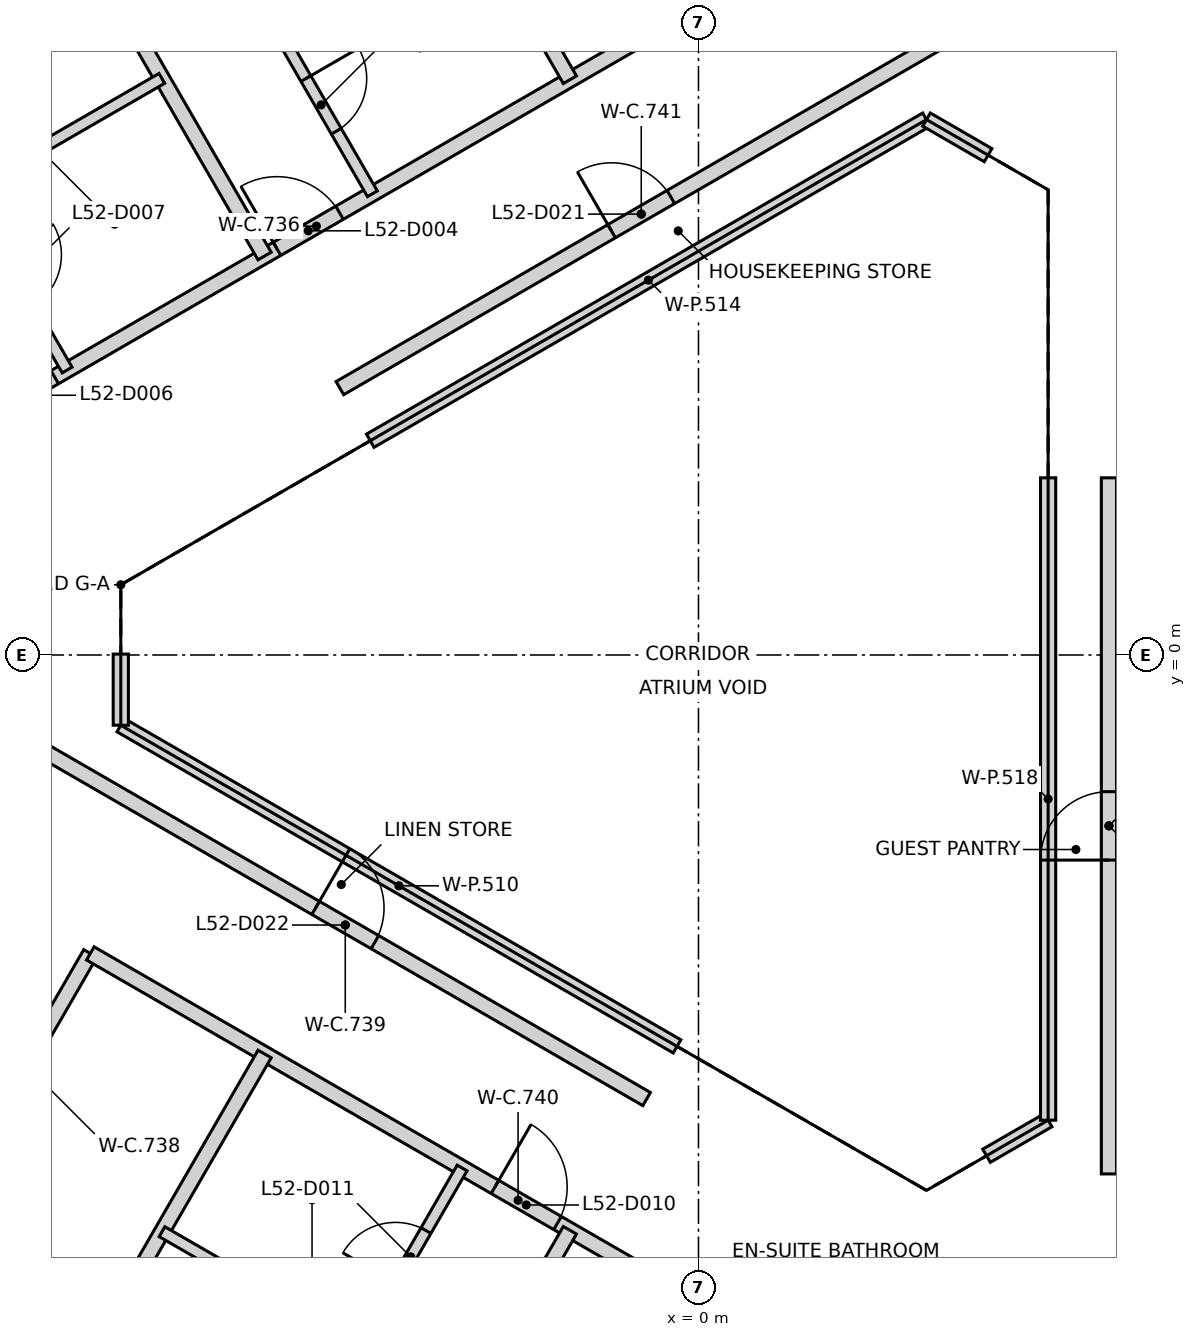
"""IFC4 building model, lengths in metres.
Left out: names, types, materials, properties, quantities, classifications, styles, units other than length and angle.
Written with IfcOpenShell. Run it as: python <this file> out.ifc"""

import sys

from ifc_helpers import new_model, si_unit, direction, frame, frame_2d, origin, place, context, subcontext, project, spatial, rectangle, extrude, element, fill, save


model = new_model("IFC4")
c1 = context("Model", 3, precision=1e-05, world=origin(), true_north=direction((0.0, 1.0)))
c2 = subcontext(c1, "Body", "Model", "MODEL_VIEW")
j1 = project(units=[si_unit("LENGTHUNIT", "METRE"), si_unit("PLANEANGLEUNIT", "RADIAN")], contexts=[c1])
p1 = place(None, origin())
s1 = spatial("IfcSite", under=j1, at=p1, CompositionType="ELEMENT")
p2 = place(p1, origin())
s2 = spatial("IfcBuilding", under=s1, at=p2, CompositionType="ELEMENT")
p3 = place(p2, frame((0.0, 0.0, 208.0)))
s3 = spatial("IfcBuildingStorey", under=s2, at=p3, CompositionType="ELEMENT", Elevation=208.0)
p4 = place(p3, frame((10.42, 6.498, 0.0), z_axis=(0.0, 0.0, 1.0), x_axis=(-0.866021906294, 0.500006057782, 0.0)))
e1 = element("IfcWall", 1, at=p4, inside=s3, PredefinedType="SHEAR", context=c2, shape_type="SweptSolid", body=[
    extrude(rectangle(XDim=11.55, YDim=0.25, at=frame_2d((5.775, 0.0))), origin(), (0.0, 0.0, 1.0), 3.2),
])
p5 = place(p4, frame((10.025, 0.0, 0.0)))
e2 = element("IfcOpeningElement", 2, at=p5, cuts=e1, PredefinedType="OPENING", context=c2, shape_type="SweptSolid", body=[
    extrude(rectangle(XDim=1.2, YDim=2.1, at=frame_2d((0.6, 1.05))), frame((0.0, 0.135, 0.0), z_axis=(0.0, -1.0, 0.0), x_axis=(1.0, 0.0, 0.0)), (0.0, 0.0, 1.0), 0.27),
])
p6 = place(p4, frame((8.725, 0.0, 0.0)))
e3 = element("IfcOpeningElement", 3, at=p6, cuts=e1, PredefinedType="OPENING", context=c2, shape_type="SweptSolid", body=[
    extrude(rectangle(XDim=1.2, YDim=2.1, at=frame_2d((0.6, 1.05))), frame((0.0, 0.135, 0.0), z_axis=(0.0, -1.0, 0.0), x_axis=(1.0, 0.0, 0.0)), (0.0, 0.0, 1.0), 0.27),
])
p7 = place(p3, frame((0.417, -12.273, 0.0), z_axis=(0.0, 0.0, 1.0), x_axis=(0.866021906294, 0.500006057782, 0.0)))
e4 = element("IfcWall", 4, at=p7, inside=s3, PredefinedType="SHEAR", context=c2, shape_type="SweptSolid", body=[
    extrude(rectangle(XDim=11.55, YDim=0.25, at=frame_2d((5.775, 0.0))), origin(), (0.0, 0.0, 1.0), 3.2),
])
p8 = place(p7, frame((10.025, 0.0, 0.0)))
e5 = element("IfcOpeningElement", 5, at=p8, cuts=e4, PredefinedType="OPENING", context=c2, shape_type="SweptSolid", body=[
    extrude(rectangle(XDim=1.2, YDim=2.1, at=frame_2d((0.6, 1.05))), frame((0.0, 0.135, 0.0), z_axis=(0.0, -1.0, 0.0), x_axis=(1.0, 0.0, 0.0)), (0.0, 0.0, 1.0), 0.27),
])
p9 = place(p7, frame((8.725, 0.0, 0.0)))
e6 = element("IfcOpeningElement", 6, at=p9, cuts=e4, PredefinedType="OPENING", context=c2, shape_type="SweptSolid", body=[
    extrude(rectangle(XDim=1.2, YDim=2.1, at=frame_2d((0.6, 1.05))), frame((0.0, 0.135, 0.0), z_axis=(0.0, -1.0, 0.0), x_axis=(1.0, 0.0, 0.0)), (0.0, 0.0, 1.0), 0.27),
])
p10 = place(p3, frame((-10.652, 2.394, 0.0), z_axis=(0.0, 0.0, 1.0), x_axis=(0.866016271077, 0.500015817979, 0.0)))
e7 = element("IfcWall", 7, at=p10, inside=s3, PredefinedType="PARTITIONING", context=c2, shape_type="SweptSolid", body=[
    extrude(rectangle(XDim=12.991, YDim=0.2, at=frame_2d((6.495, 0.0))), origin(), (0.0, 0.0, 1.0), 3.2),
])
p11 = place(p10, frame((5.898, 0.0, 0.0)))
e8 = element("IfcOpeningElement", 8, at=p11, cuts=e7, PredefinedType="OPENING", context=c2, shape_type="SweptSolid", body=[
    extrude(rectangle(XDim=0.95, YDim=2.1, at=frame_2d((0.475, 1.05))), frame((0.0, 0.11, 0.0), z_axis=(0.0, -1.0, 0.0), x_axis=(1.0, 0.0, 0.0)), (0.0, 0.0, 1.0), 0.22),
])
p12 = place(p10, frame((1.571, 0.0, 0.0)))
e9 = element("IfcOpeningElement", 9, at=p12, cuts=e7, PredefinedType="OPENING", context=c2, shape_type="SweptSolid", body=[
    extrude(rectangle(XDim=0.95, YDim=2.1, at=frame_2d((0.475, 1.05))), frame((0.0, 0.11, 0.0), z_axis=(0.0, -1.0, 0.0), x_axis=(1.0, 0.0, 0.0)), (0.0, 0.0, 1.0), 0.22),
])
p13 = place(p3, frame((-9.697, -6.864, 0.0), z_axis=(0.0, 0.0, 1.0), x_axis=(0.499955030392, 0.866051365443, 0.0)))
e10 = element("IfcWall", 10, at=p13, inside=s3, PredefinedType="PARTITIONING", context=c2, shape_type="SweptSolid", body=[
    extrude(rectangle(XDim=3.392, YDim=0.2, at=frame_2d((1.696, 0.0))), origin(), (0.0, 0.0, 1.0), 3.2),
])
p14 = place(p13, frame((1.196, 0.0, 0.0)))
e11 = element("IfcOpeningElement", 11, at=p14, cuts=e10, PredefinedType="OPENING", context=c2, shape_type="SweptSolid", body=[
    extrude(rectangle(XDim=1.0, YDim=2.1, at=frame_2d((0.5, 1.05))), frame((0.0, 0.11, 0.0), z_axis=(0.0, -1.0, 0.0), x_axis=(1.0, 0.0, 0.0)), (0.0, 0.0, 1.0), 0.22),
])
p15 = place(p3, frame((-8.612, -1.263, 0.0), z_axis=(0.0, 0.0, 1.0), x_axis=(0.865996442381, -0.500050159267, 0.0)))
e12 = element("IfcWall", 12, at=p15, inside=s3, PredefinedType="PARTITIONING", context=c2, shape_type="SweptSolid", body=[
    extrude(rectangle(XDim=9.157, YDim=0.2, at=frame_2d((4.579, 0.0))), origin(), (0.0, 0.0, 1.0), 3.2),
])
p16 = place(p15, frame((4.128, 0.0, 0.0)))
e13 = element("IfcOpeningElement", 13, at=p16, cuts=e12, PredefinedType="OPENING", context=c2, shape_type="SweptSolid", body=[
    extrude(rectangle(XDim=0.9, YDim=2.1, at=frame_2d((0.45, 1.05))), frame((0.0, 0.11, 0.0), z_axis=(0.0, -1.0, 0.0), x_axis=(1.0, 0.0, 0.0)), (0.0, 0.0, 1.0), 0.22),
])
p17 = place(p3, frame((-8.001, -3.926, 0.0), z_axis=(0.0, 0.0, 1.0), x_axis=(0.866131158271, -0.499816783104, 0.0)))
e14 = element("IfcWall", 14, at=p17, inside=s3, PredefinedType="PARTITIONING", context=c2, shape_type="SweptSolid", body=[
    extrude(rectangle(XDim=12.995, YDim=0.2, at=frame_2d((6.498, 0.0))), origin(), (0.0, 0.0, 1.0), 3.2),
])
p18 = place(p17, frame((6.146, 0.0, 0.0)))
e15 = element("IfcOpeningElement", 15, at=p18, cuts=e14, PredefinedType="OPENING", context=c2, shape_type="SweptSolid", body=[
    extrude(rectangle(XDim=0.95, YDim=2.1, at=frame_2d((0.475, 1.05))), frame((0.0, 0.11, 0.0), z_axis=(0.0, -1.0, 0.0), x_axis=(1.0, 0.0, 0.0)), (0.0, 0.0, 1.0), 0.22),
])
p19 = place(p17, frame((10.472, 0.0, 0.0)))
e16 = element("IfcOpeningElement", 16, at=p19, cuts=e14, PredefinedType="OPENING", context=c2, shape_type="SweptSolid", body=[
    extrude(rectangle(XDim=0.95, YDim=2.1, at=frame_2d((0.475, 1.05))), frame((0.0, 0.11, 0.0), z_axis=(0.0, -1.0, 0.0), x_axis=(1.0, 0.0, 0.0)), (0.0, 0.0, 1.0), 0.22),
])
p20 = place(p3, frame((-4.718, 3.511, 0.0), z_axis=(0.0, 0.0, 1.0), x_axis=(0.865989775611, 0.500061704731, 0.0)))
e17 = element("IfcWall", 17, at=p20, inside=s3, PredefinedType="PARTITIONING", context=c2, shape_type="SweptSolid", body=[
    extrude(rectangle(XDim=9.157, YDim=0.2, at=frame_2d((4.579, 0.0))), origin(), (0.0, 0.0, 1.0), 3.2),
])
p21 = place(p20, frame((4.128, 0.0, 0.0)))
e18 = element("IfcOpeningElement", 18, at=p21, cuts=e17, PredefinedType="OPENING", context=c2, shape_type="SweptSolid", body=[
    extrude(rectangle(XDim=0.9, YDim=2.1, at=frame_2d((0.45, 1.05))), frame((0.0, 0.11, 0.0), z_axis=(0.0, -1.0, 0.0), x_axis=(1.0, 0.0, 0.0)), (0.0, 0.0, 1.0), 0.22),
])
p22 = place(p3, frame((5.4, -6.827, 0.0), z_axis=(0.0, 0.0, 1.0), x_axis=(0.0, 1.0, 0.0)))
e19 = element("IfcWall", 19, at=p22, inside=s3, PredefinedType="PARTITIONING", context=c2, shape_type="SweptSolid", body=[
    extrude(rectangle(XDim=9.158, YDim=0.2, at=frame_2d((4.579, 0.0))), origin(), (0.0, 0.0, 1.0), 3.2),
])
p23 = place(p22, frame((4.129, 0.0, 0.0)))
e20 = element("IfcOpeningElement", 20, at=p23, cuts=e19, PredefinedType="OPENING", context=c2, shape_type="SweptSolid", body=[
    extrude(rectangle(XDim=0.9, YDim=2.1, at=frame_2d((0.45, 1.05))), frame((0.0, 0.11, 0.0), z_axis=(0.0, -1.0, 0.0), x_axis=(1.0, 0.0, 0.0)), (0.0, 0.0, 1.0), 0.22),
])
for number, where, z_axis, x_axis in (
    (21, (-11.661, -15.561, 0.0), (0.0, 0.0, 1.0), (0.5, 0.866, 0.0)),
    (22, (-11.661, 15.561, 0.0), (0.0, 0.0, 1.0), (0.5, -0.866, 0.0)),
):
    element("IfcWall", number, at=place(p3, frame(where, z_axis=z_axis, x_axis=x_axis)), inside=s3, PredefinedType="PARTITIONING", context=c2, shape_type="SweptSolid", body=[
        extrude(rectangle(XDim=11.907, YDim=0.2, at=frame_2d((5.953, 0.0))), origin(), (0.0, 0.0, 1.0), 3.2),
    ])
p24 = place(p3, frame((-7.6, -0.924, 0.0), z_axis=(0.0, 0.0, 1.0), x_axis=(0.866038843867, -0.499976720371, 0.0)))
e23 = element("IfcWall", 23, at=p24, inside=s3, PredefinedType="PARTITIONING", context=c2, shape_type="SweptSolid", body=[
    extrude(rectangle(XDim=8.45, YDim=0.2, at=frame_2d((4.225, 0.0))), origin(), (0.0, 0.0, 1.0), 3.2),
])
p25 = place(p3, frame((-7.6, -0.924, 0.0), z_axis=(0.0, 0.0, 1.0), x_axis=(0.0, 1.0, 0.0)))
e24 = element("IfcWall", 24, at=p25, inside=s3, PredefinedType="PARTITIONING", context=c2, shape_type="SweptSolid", body=[
    extrude(rectangle(XDim=0.936, YDim=0.2, at=frame_2d((0.468, 0.0))), origin(), (0.0, 0.0, 1.0), 3.2),
])
for number, where, z_axis, x_axis in (
    (25, (-7.646, -17.879, 0.0), (0.0, 0.0, 1.0), (0.5, 0.866, 0.0)),
    (26, (-7.646, 17.879, 0.0), (0.0, 0.0, 1.0), (0.5, -0.866, 0.0)),
):
    element("IfcWall", number, at=place(p3, frame(where, z_axis=z_axis, x_axis=x_axis)), inside=s3, PredefinedType="PARTITIONING", context=c2, shape_type="SweptSolid", body=[
        extrude(rectangle(XDim=11.906, YDim=0.2, at=frame_2d((5.953, 0.0))), origin(), (0.0, 0.0, 1.0), 3.2),
    ])
p26 = place(p3, frame((-4.318, 2.819, 0.0), z_axis=(0.0, 0.0, 1.0), x_axis=(0.866038843867, 0.499976720371, 0.0)))
e27 = element("IfcWall", 27, at=p26, inside=s3, PredefinedType="PARTITIONING", context=c2, shape_type="SweptSolid", body=[
    extrude(rectangle(XDim=8.45, YDim=0.2, at=frame_2d((4.225, 0.0))), origin(), (0.0, 0.0, 1.0), 3.2),
])
p27 = place(p3, frame((3.0, 7.044, 0.0), z_axis=(0.0, 0.0, 1.0), x_axis=(0.865872609263, -0.500264554538, 0.0)))
e28 = element("IfcWall", 28, at=p27, inside=s3, PredefinedType="PARTITIONING", context=c2, shape_type="SweptSolid", body=[
    extrude(rectangle(XDim=0.936, YDim=0.2, at=frame_2d((0.468, 0.0))), origin(), (0.0, 0.0, 1.0), 3.2),
])
p28 = place(p3, frame((3.79, -6.588, 0.0), z_axis=(0.0, 0.0, 1.0), x_axis=(0.865985641702, 0.500068863623, 0.0)))
e29 = element("IfcWall", 29, at=p28, inside=s3, PredefinedType="PARTITIONING", context=c2, shape_type="SweptSolid", body=[
    extrude(rectangle(XDim=0.935, YDim=0.2, at=frame_2d((0.468, 0.0))), origin(), (0.0, 0.0, 1.0), 3.2),
])
p29 = place(p3, frame((4.6, -6.12, 0.0), z_axis=(0.0, 0.0, 1.0), x_axis=(0.0, 1.0, 0.0)))
e30 = element("IfcWall", 30, at=p29, inside=s3, PredefinedType="PARTITIONING", context=c2, shape_type="SweptSolid", body=[
    extrude(rectangle(XDim=8.451, YDim=0.2, at=frame_2d((4.226, 0.0))), origin(), (0.0, 0.0, 1.0), 3.2),
])
p30 = place(p3, frame((-9.655, 6.085, 0.0), z_axis=(0.0, 0.0, 1.0), x_axis=(0.500129820725, -0.865950438779, 0.0)))
e31 = element("IfcWall", 31, at=p30, inside=s3, PredefinedType="PARTITIONING", context=c2, shape_type="SweptSolid", body=[
    extrude(rectangle(XDim=2.698, YDim=0.15, at=frame_2d((1.349, 0.0))), origin(), (0.0, 0.0, 1.0), 3.2),
])
p31 = place(p30, frame((0.948, 0.0, 0.0)))
e32 = element("IfcOpeningElement", 32, at=p31, cuts=e31, PredefinedType="OPENING", context=c2, shape_type="SweptSolid", body=[
    extrude(rectangle(XDim=0.8, YDim=2.1, at=frame_2d((0.4, 1.05))), frame((0.0, 0.085, 0.0), z_axis=(0.0, -1.0, 0.0), x_axis=(1.0, 0.0, 0.0)), (0.0, 0.0, 1.0), 0.17),
])
p32 = place(p3, frame((-9.653, 6.089, 0.0), z_axis=(0.0, 0.0, 1.0), x_axis=(0.866021254674, 0.500007186402, 0.0)))
e33 = element("IfcWall", 33, at=p32, inside=s3, PredefinedType="PARTITIONING", context=c2, shape_type="SweptSolid", body=[
    extrude(rectangle(XDim=2.994, YDim=0.15, at=frame_2d((1.497, 0.0))), origin(), (0.0, 0.0, 1.0), 3.2),
])
p33 = place(p3, frame((-7.058, -7.587, 0.0), z_axis=(0.0, 0.0, 1.0), x_axis=(0.866031096941, -0.499990139034, 0.0)))
e34 = element("IfcWall", 34, at=p33, inside=s3, PredefinedType="PARTITIONING", context=c2, shape_type="SweptSolid", body=[
    extrude(rectangle(XDim=3.0, YDim=0.15, at=frame_2d((1.5, 0.0))), origin(), (0.0, 0.0, 1.0), 3.2),
])
p34 = place(p3, frame((-5.64, 8.406, 0.0), z_axis=(0.0, 0.0, 1.0), x_axis=(0.50001992892, -0.866013897511, 0.0)))
e35 = element("IfcWall", 35, at=p34, inside=s3, PredefinedType="PARTITIONING", context=c2, shape_type="SweptSolid", body=[
    extrude(rectangle(XDim=2.7, YDim=0.15, at=frame_2d((1.35, 0.0))), origin(), (0.0, 0.0, 1.0), 3.2),
])
p35 = place(p34, frame((0.95, 0.0, 0.0)))
e36 = element("IfcOpeningElement", 36, at=p35, cuts=e35, PredefinedType="OPENING", context=c2, shape_type="SweptSolid", body=[
    extrude(rectangle(XDim=0.8, YDim=2.1, at=frame_2d((0.4, 1.05))), frame((0.0, 0.085, 0.0), z_axis=(0.0, -1.0, 0.0), x_axis=(1.0, 0.0, 0.0)), (0.0, 0.0, 1.0), 0.17),
])
p36 = place(p3, frame((-4.46, -9.087, 0.0), z_axis=(0.0, 0.0, 1.0), x_axis=(0.50001992892, 0.866013897511, 0.0)))
e37 = element("IfcWall", 37, at=p36, inside=s3, PredefinedType="PARTITIONING", context=c2, shape_type="SweptSolid", body=[
    extrude(rectangle(XDim=2.7, YDim=0.15, at=frame_2d((1.35, 0.0))), origin(), (0.0, 0.0, 1.0), 3.2),
])
p37 = place(p36, frame((0.95, 0.0, 0.0)))
e38 = element("IfcOpeningElement", 38, at=p37, cuts=e37, PredefinedType="OPENING", context=c2, shape_type="SweptSolid", body=[
    extrude(rectangle(XDim=0.8, YDim=2.1, at=frame_2d((0.4, 1.05))), frame((0.0, 0.085, 0.0), z_axis=(0.0, -1.0, 0.0), x_axis=(1.0, 0.0, 0.0)), (0.0, 0.0, 1.0), 0.17),
])
p38 = place(p11, origin())
e39 = element("IfcDoor", 39, at=p38, inside=s3, OperationType="SINGLE_SWING_LEFT", PredefinedType="DOOR", context=c2, shape_type="SweptSolid", body=[
    extrude(rectangle(XDim=0.95, YDim=2.1, at=frame_2d((0.475, 1.05))), frame((0.0, 0.025, 0.0), z_axis=(0.0, -1.0, 0.0), x_axis=(1.0, 0.0, 0.0)), (0.0, 0.0, 1.0), 0.05),
])
fill(e8, e39)
p39 = place(p35, origin())
e40 = element("IfcDoor", 40, at=p39, inside=s3, OperationType="SINGLE_SWING_LEFT", PredefinedType="DOOR", context=c2, shape_type="SweptSolid", body=[
    extrude(rectangle(XDim=0.8, YDim=2.1, at=frame_2d((0.4, 1.05))), frame((0.0, 0.025, 0.0), z_axis=(0.0, -1.0, 0.0), x_axis=(1.0, 0.0, 0.0)), (0.0, 0.0, 1.0), 0.05),
])
fill(e36, e40)
p40 = place(p12, origin())
e41 = element("IfcDoor", 41, at=p40, inside=s3, OperationType="SINGLE_SWING_LEFT", PredefinedType="DOOR", context=c2, shape_type="SweptSolid", body=[
    extrude(rectangle(XDim=0.95, YDim=2.1, at=frame_2d((0.475, 1.05))), frame((0.0, 0.025, 0.0), z_axis=(0.0, -1.0, 0.0), x_axis=(1.0, 0.0, 0.0)), (0.0, 0.0, 1.0), 0.05),
])
fill(e9, e41)
p41 = place(p18, frame((0.95, 0.0, 0.0), z_axis=(0.0, 0.0, 1.0), x_axis=(-1.0, 0.0, 0.0)))
e42 = element("IfcDoor", 42, at=p41, inside=s3, OperationType="SINGLE_SWING_LEFT", PredefinedType="DOOR", context=c2, shape_type="SweptSolid", body=[
    extrude(rectangle(XDim=0.95, YDim=2.1, at=frame_2d((0.475, 1.05))), frame((0.0, 0.025, 0.0), z_axis=(0.0, -1.0, 0.0), x_axis=(1.0, 0.0, 0.0)), (0.0, 0.0, 1.0), 0.05),
])
fill(e15, e42)
p42 = place(p37, origin())
e43 = element("IfcDoor", 43, at=p42, inside=s3, OperationType="SINGLE_SWING_LEFT", PredefinedType="DOOR", context=c2, shape_type="SweptSolid", body=[
    extrude(rectangle(XDim=0.8, YDim=2.1, at=frame_2d((0.4, 1.05))), frame((0.0, 0.025, 0.0), z_axis=(0.0, -1.0, 0.0), x_axis=(1.0, 0.0, 0.0)), (0.0, 0.0, 1.0), 0.05),
])
fill(e38, e43)
p43 = place(p23, origin())
e44 = element("IfcDoor", 44, at=p43, inside=s3, OperationType="SINGLE_SWING_LEFT", PredefinedType="DOOR", context=c2, shape_type="SweptSolid", body=[
    extrude(rectangle(XDim=0.9, YDim=2.1, at=frame_2d((0.45, 1.05))), frame((0.0, 0.025, 0.0), z_axis=(0.0, -1.0, 0.0), x_axis=(1.0, 0.0, 0.0)), (0.0, 0.0, 1.0), 0.05),
])
fill(e20, e44)
p44 = place(p21, frame((0.9, 0.0, 0.0), z_axis=(0.0, 0.0, 1.0), x_axis=(-1.0, 0.0, 0.0)))
e45 = element("IfcDoor", 45, at=p44, inside=s3, OperationType="SINGLE_SWING_LEFT", PredefinedType="DOOR", context=c2, shape_type="SweptSolid", body=[
    extrude(rectangle(XDim=0.9, YDim=2.1, at=frame_2d((0.45, 1.05))), frame((0.0, 0.025, 0.0), z_axis=(0.0, -1.0, 0.0), x_axis=(1.0, 0.0, 0.0)), (0.0, 0.0, 1.0), 0.05),
])
fill(e18, e45)
p45 = place(p16, origin())
e46 = element("IfcDoor", 46, at=p45, inside=s3, OperationType="SINGLE_SWING_LEFT", PredefinedType="DOOR", context=c2, shape_type="SweptSolid", body=[
    extrude(rectangle(XDim=0.9, YDim=2.1, at=frame_2d((0.45, 1.05))), frame((0.0, 0.025, 0.0), z_axis=(0.0, -1.0, 0.0), x_axis=(1.0, 0.0, 0.0)), (0.0, 0.0, 1.0), 0.05),
])
fill(e13, e46)
save(model, sys.argv[1])
